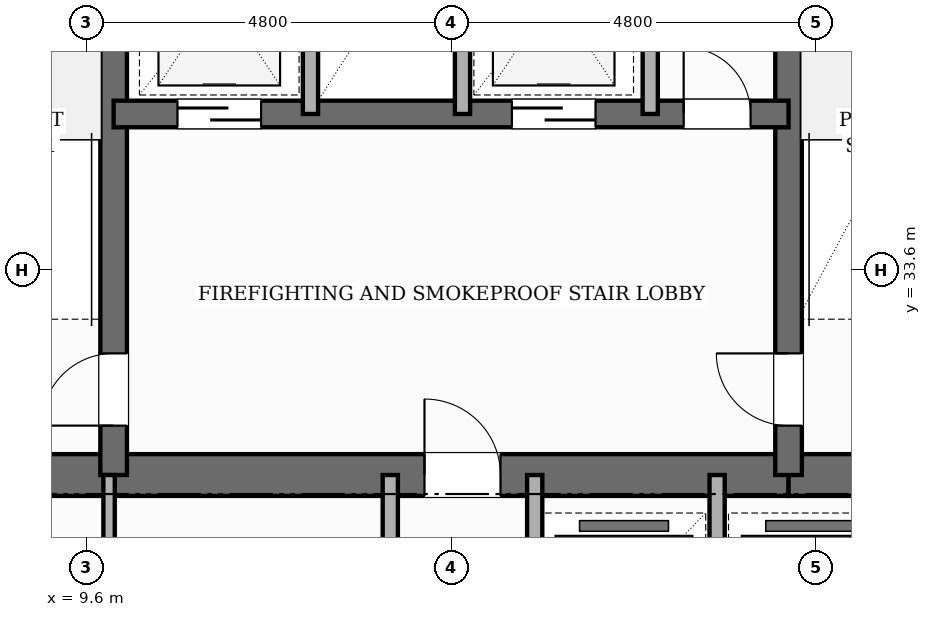
"""IFC4 building model, lengths in metres.
Left out: names, types, materials, properties, quantities, classifications, styles, units other than length and angle.
Written with IfcOpenShell. Run it as: python <this file> out.ifc"""

import sys

from ifc_helpers import new_model, si_unit, direction, frame, frame_2d, origin, place, context, subcontext, project, spatial, rectangle, extrude, element, fill, save


model = new_model("IFC4")
c1 = context("Model", 3, precision=1e-05, world=origin(), true_north=direction((0.0, 1.0)))
c2 = subcontext(c1, "Body", "Model", "MODEL_VIEW")
j1 = project(units=[si_unit("LENGTHUNIT", "METRE"), si_unit("PLANEANGLEUNIT", "RADIAN")], contexts=[c1])
p1 = place(None, origin())
s1 = spatial("IfcSite", under=j1, at=p1, CompositionType="ELEMENT")
p2 = place(p1, origin())
s2 = spatial("IfcBuilding", under=s1, at=p2, CompositionType="ELEMENT")
p3 = place(p2, frame((0.0, 0.0, 110.8)))
s3 = spatial("IfcBuildingStorey", under=s2, at=p3, CompositionType="ELEMENT", Elevation=110.8)
p4 = place(p3, frame((6.05, 30.9, 0.0), z_axis=(0.0, 0.0, 1.0), x_axis=(1.0, 0.0, 0.0)))
e1 = element("IfcWall", 1, at=p4, inside=s3, PredefinedType="SHEAR", context=c2, shape_type="SweptSolid", body=[
    extrude(rectangle(XDim=3.91, YDim=0.55, at=frame_2d((1.955, 0.0))), origin(), (0.0, 0.0, 1.0), 3.6),
])
p5 = place(p3, frame((9.96, 30.9, 0.0), z_axis=(0.0, 0.0, 1.0), x_axis=(1.0, 0.0, 0.0)))
e2 = element("IfcWall", 2, at=p5, inside=s3, PredefinedType="SHEAR", context=c2, shape_type="SweptSolid", body=[
    extrude(rectangle(XDim=8.88, YDim=0.55, at=frame_2d((4.44, 0.0))), origin(), (0.0, 0.0, 1.0), 3.6),
])
p6 = place(p5, frame((4.09, 0.0, 0.0)))
e3 = element("IfcOpeningElement", 3, at=p6, cuts=e2, PredefinedType="OPENING", context=c2, shape_type="SweptSolid", body=[
    extrude(rectangle(XDim=1.0, YDim=2.15, at=frame_2d((0.5, 1.075))), frame((0.0, 0.285, 0.0), z_axis=(0.0, -1.0, 0.0), x_axis=(1.0, 0.0, 0.0)), (0.0, 0.0, 1.0), 0.57),
])
p7 = place(p3, frame((18.84, 30.9, 0.0), z_axis=(0.0, 0.0, 1.0), x_axis=(1.0, 0.0, 0.0)))
e4 = element("IfcWall", 4, at=p7, inside=s3, PredefinedType="SHEAR", context=c2, shape_type="SweptSolid", body=[
    extrude(rectangle(XDim=3.91, YDim=0.55, at=frame_2d((1.955, 0.0))), origin(), (0.0, 0.0, 1.0), 3.6),
])
p8 = place(p3, frame((9.96, 30.9, 0.0), z_axis=(0.0, 0.0, 1.0), x_axis=(0.0, 1.0, 0.0)))
e5 = element("IfcWall", 5, at=p8, inside=s3, PredefinedType="SHEAR", context=c2, shape_type="SweptSolid", body=[
    extrude(rectangle(XDim=14.9, YDim=0.35, at=frame_2d((7.45, 0.0))), origin(), (0.0, 0.0, 1.0), 3.6),
])
p9 = place(p8, frame((0.65, 0.0, 0.0)))
e6 = element("IfcOpeningElement", 6, at=p9, cuts=e5, PredefinedType="OPENING", context=c2, shape_type="SweptSolid", body=[
    extrude(rectangle(XDim=0.95, YDim=2.1, at=frame_2d((0.475, 1.05))), frame((0.0, 0.185, 0.0), z_axis=(0.0, -1.0, 0.0), x_axis=(1.0, 0.0, 0.0)), (0.0, 0.0, 1.0), 0.37),
])
p10 = place(p8, frame((10.45, 0.0, 0.0)))
e7 = element("IfcOpeningElement", 7, at=p10, cuts=e5, PredefinedType="OPENING", context=c2, shape_type="SweptSolid", body=[
    extrude(rectangle(XDim=1.0, YDim=2.15, at=frame_2d((0.5, 1.075))), frame((0.0, 0.185, 0.0), z_axis=(0.0, -1.0, 0.0), x_axis=(1.0, 0.0, 0.0)), (0.0, 0.0, 1.0), 0.37),
])
p11 = place(p3, frame((18.84, 30.9, 0.0), z_axis=(0.0, 0.0, 1.0), x_axis=(0.0, 1.0, 0.0)))
e8 = element("IfcWall", 8, at=p11, inside=s3, PredefinedType="SHEAR", context=c2, shape_type="SweptSolid", body=[
    extrude(rectangle(XDim=14.9, YDim=0.35, at=frame_2d((7.45, 0.0))), origin(), (0.0, 0.0, 1.0), 3.6),
])
p12 = place(p11, frame((0.65, 0.0, 0.0)))
e9 = element("IfcOpeningElement", 9, at=p12, cuts=e8, PredefinedType="OPENING", context=c2, shape_type="SweptSolid", body=[
    extrude(rectangle(XDim=0.95, YDim=2.1, at=frame_2d((0.475, 1.05))), frame((0.0, 0.185, 0.0), z_axis=(0.0, -1.0, 0.0), x_axis=(1.0, 0.0, 0.0)), (0.0, 0.0, 1.0), 0.37),
])
p13 = place(p11, frame((10.45, 0.0, 0.0)))
e10 = element("IfcOpeningElement", 10, at=p13, cuts=e8, PredefinedType="OPENING", context=c2, shape_type="SweptSolid", body=[
    extrude(rectangle(XDim=1.0, YDim=2.15, at=frame_2d((0.5, 1.075))), frame((0.0, 0.185, 0.0), z_axis=(0.0, -1.0, 0.0), x_axis=(1.0, 0.0, 0.0)), (0.0, 0.0, 1.0), 0.37),
])
p14 = place(p3, frame((9.96, 35.65, 0.0), z_axis=(0.0, 0.0, 1.0), x_axis=(1.0, 0.0, 0.0)))
e11 = element("IfcWall", 11, at=p14, inside=s3, PredefinedType="SHEAR", context=c2, shape_type="SweptSolid", body=[
    extrude(rectangle(XDim=8.88, YDim=0.35, at=frame_2d((4.44, 0.0))), origin(), (0.0, 0.0, 1.0), 3.6),
])
p15 = place(p14, frame((0.84, 0.0, 0.0)))
e12 = element("IfcOpeningElement", 12, at=p15, cuts=e11, PredefinedType="OPENING", context=c2, shape_type="SweptSolid", body=[
    extrude(rectangle(XDim=1.1, YDim=2.15, at=frame_2d((0.55, 1.075))), frame((0.0, 0.185, 0.0), z_axis=(0.0, -1.0, 0.0), x_axis=(1.0, 0.0, 0.0)), (0.0, 0.0, 1.0), 0.37),
])
p16 = place(p14, frame((5.24, 0.0, 0.0)))
e13 = element("IfcOpeningElement", 13, at=p16, cuts=e11, PredefinedType="OPENING", context=c2, shape_type="SweptSolid", body=[
    extrude(rectangle(XDim=1.1, YDim=2.15, at=frame_2d((0.55, 1.075))), frame((0.0, 0.185, 0.0), z_axis=(0.0, -1.0, 0.0), x_axis=(1.0, 0.0, 0.0)), (0.0, 0.0, 1.0), 0.37),
])
p17 = place(p14, frame((7.5, 0.0, 0.0)))
e14 = element("IfcOpeningElement", 14, at=p17, cuts=e11, PredefinedType="OPENING", context=c2, shape_type="SweptSolid", body=[
    extrude(rectangle(XDim=0.88, YDim=2.1, at=frame_2d((0.44, 1.05))), frame((0.0, 0.185, 0.0), z_axis=(0.0, -1.0, 0.0), x_axis=(1.0, 0.0, 0.0)), (0.0, 0.0, 1.0), 0.37),
])
for number, where, z_axis, x_axis in (
    (15, (12.55, 35.65, 0.0), (0.0, 0.0, 1.0), (0.0, 1.0, 0.0)),
    (16, (14.55, 35.65, 0.0), (0.0, 0.0, 1.0), (0.0, 1.0, 0.0)),
):
    element("IfcWall", number, at=place(p3, frame(where, z_axis=z_axis, x_axis=x_axis)), inside=s3, PredefinedType="POLYGONAL", context=c2, shape_type="SweptSolid", body=[
        extrude(rectangle(XDim=3.07, YDim=0.2, at=frame_2d((1.535, 0.0))), origin(), (0.0, 0.0, 1.0), 3.36),
    ])
p18 = place(p3, frame((17.02, 35.65, 0.0), z_axis=(0.0, 0.0, 1.0), x_axis=(0.0, 1.0, 0.0)))
e17 = element("IfcWall", 17, at=p18, inside=s3, PredefinedType="POLYGONAL", context=c2, shape_type="SweptSolid", body=[
    extrude(rectangle(XDim=5.15, YDim=0.2, at=frame_2d((2.575, 0.0))), origin(), (0.0, 0.0, 1.0), 3.36),
])
p19 = place(p3, frame((13.6, 25.75, 0.0), z_axis=(0.0, 0.0, 1.0), x_axis=(0.0, 1.0, 0.0)))
e18 = element("IfcWall", 18, at=p19, inside=s3, PredefinedType="POLYGONAL", context=c2, shape_type="SweptSolid", body=[
    extrude(rectangle(XDim=5.15, YDim=0.2, at=frame_2d((2.575, 0.0))), origin(), (0.0, 0.0, 1.0), 3.36),
])
p20 = place(p19, frame((0.7, 0.0, 0.0)))
e19 = element("IfcOpeningElement", 19, at=p20, cuts=e18, PredefinedType="OPENING", context=c2, shape_type="SweptSolid", body=[
    extrude(rectangle(XDim=1.0, YDim=2.15, at=frame_2d((0.5, 1.075))), frame((0.0, 0.11, 0.0), z_axis=(0.0, -1.0, 0.0), x_axis=(1.0, 0.0, 0.0)), (0.0, 0.0, 1.0), 0.22),
])
p21 = place(p3, frame((9.9, 25.75, 0.0), z_axis=(0.0, 0.0, 1.0), x_axis=(0.0, 1.0, 0.0)))
e20 = element("IfcWall", 20, at=p21, inside=s3, PredefinedType="PARTITIONING", context=c2, shape_type="SweptSolid", body=[
    extrude(rectangle(XDim=5.15, YDim=0.15, at=frame_2d((2.575, 0.0))), origin(), (0.0, 0.0, 1.0), 3.36),
])
p22 = place(p21, frame((1.2, 0.0, 0.0)))
e21 = element("IfcOpeningElement", 21, at=p22, cuts=e20, PredefinedType="OPENING", context=c2, shape_type="SweptSolid", body=[
    extrude(rectangle(XDim=0.95, YDim=2.15, at=frame_2d((0.475, 1.075))), frame((0.0, 0.085, 0.0), z_axis=(0.0, -1.0, 0.0), x_axis=(1.0, 0.0, 0.0)), (0.0, 0.0, 1.0), 0.17),
])
for number, where, z_axis, x_axis in (
    (22, (15.5, 28.0, 0.0), (0.0, 0.0, 1.0), (0.0, 1.0, 0.0)),
    (23, (17.9, 28.0, 0.0), (0.0, 0.0, 1.0), (0.0, 1.0, 0.0)),
):
    element("IfcWall", number, at=place(p3, frame(where, z_axis=z_axis, x_axis=x_axis)), inside=s3, PredefinedType="POLYGONAL", context=c2, shape_type="SweptSolid", body=[
        extrude(rectangle(XDim=2.9, YDim=0.2, at=frame_2d((1.45, 0.0))), origin(), (0.0, 0.0, 1.0), 3.36),
    ])
p23 = place(p9, origin())
e24 = element("IfcDoor", 24, at=p23, inside=s3, OperationType="SINGLE_SWING_LEFT", PredefinedType="DOOR", context=c2, shape_type="SweptSolid", body=[
    extrude(rectangle(XDim=0.95, YDim=2.1, at=frame_2d((0.475, 1.05))), frame((0.0, 0.025, 0.0), z_axis=(0.0, -1.0, 0.0), x_axis=(1.0, 0.0, 0.0)), (0.0, 0.0, 1.0), 0.05),
])
fill(e6, e24)
p24 = place(p12, origin())
e25 = element("IfcDoor", 25, at=p24, inside=s3, OperationType="SINGLE_SWING_RIGHT", PredefinedType="DOOR", context=c2, shape_type="SweptSolid", body=[
    extrude(rectangle(XDim=0.95, YDim=2.1, at=frame_2d((0.475, 1.05))), frame((0.0, 0.025, 0.0), z_axis=(0.0, -1.0, 0.0), x_axis=(1.0, 0.0, 0.0)), (0.0, 0.0, 1.0), 0.05),
])
fill(e9, e25)
p25 = place(p6, origin())
e26 = element("IfcDoor", 26, at=p25, inside=s3, OperationType="SINGLE_SWING_LEFT", PredefinedType="DOOR", context=c2, shape_type="SweptSolid", body=[
    extrude(rectangle(XDim=1.0, YDim=2.15, at=frame_2d((0.5, 1.075))), frame((0.0, 0.025, 0.0), z_axis=(0.0, -1.0, 0.0), x_axis=(1.0, 0.0, 0.0)), (0.0, 0.0, 1.0), 0.05),
])
fill(e3, e26)
p26 = place(p15, origin())
e27 = element("IfcDoor", 27, at=p26, inside=s3, OperationType="SLIDING_TO_LEFT", PredefinedType="DOOR", context=c2, shape_type="SweptSolid", body=[
    extrude(rectangle(XDim=1.1, YDim=2.15, at=frame_2d((0.55, 1.075))), frame((0.0, 0.025, 0.0), z_axis=(0.0, -1.0, 0.0), x_axis=(1.0, 0.0, 0.0)), (0.0, 0.0, 1.0), 0.05),
])
fill(e12, e27)
p27 = place(p16, origin())
e28 = element("IfcDoor", 28, at=p27, inside=s3, OperationType="SLIDING_TO_RIGHT", PredefinedType="DOOR", context=c2, shape_type="SweptSolid", body=[
    extrude(rectangle(XDim=1.1, YDim=2.15, at=frame_2d((0.55, 1.075))), frame((0.0, 0.025, 0.0), z_axis=(0.0, -1.0, 0.0), x_axis=(1.0, 0.0, 0.0)), (0.0, 0.0, 1.0), 0.05),
])
fill(e13, e28)
p28 = place(p17, origin())
e29 = element("IfcDoor", 29, at=p28, inside=s3, OperationType="SINGLE_SWING_LEFT", PredefinedType="DOOR", context=c2, shape_type="SweptSolid", body=[
    extrude(rectangle(XDim=0.88, YDim=2.1, at=frame_2d((0.44, 1.05))), frame((0.0, 0.025, 0.0), z_axis=(0.0, -1.0, 0.0), x_axis=(1.0, 0.0, 0.0)), (0.0, 0.0, 1.0), 0.05),
])
fill(e14, e29)
save(model, sys.argv[1])
